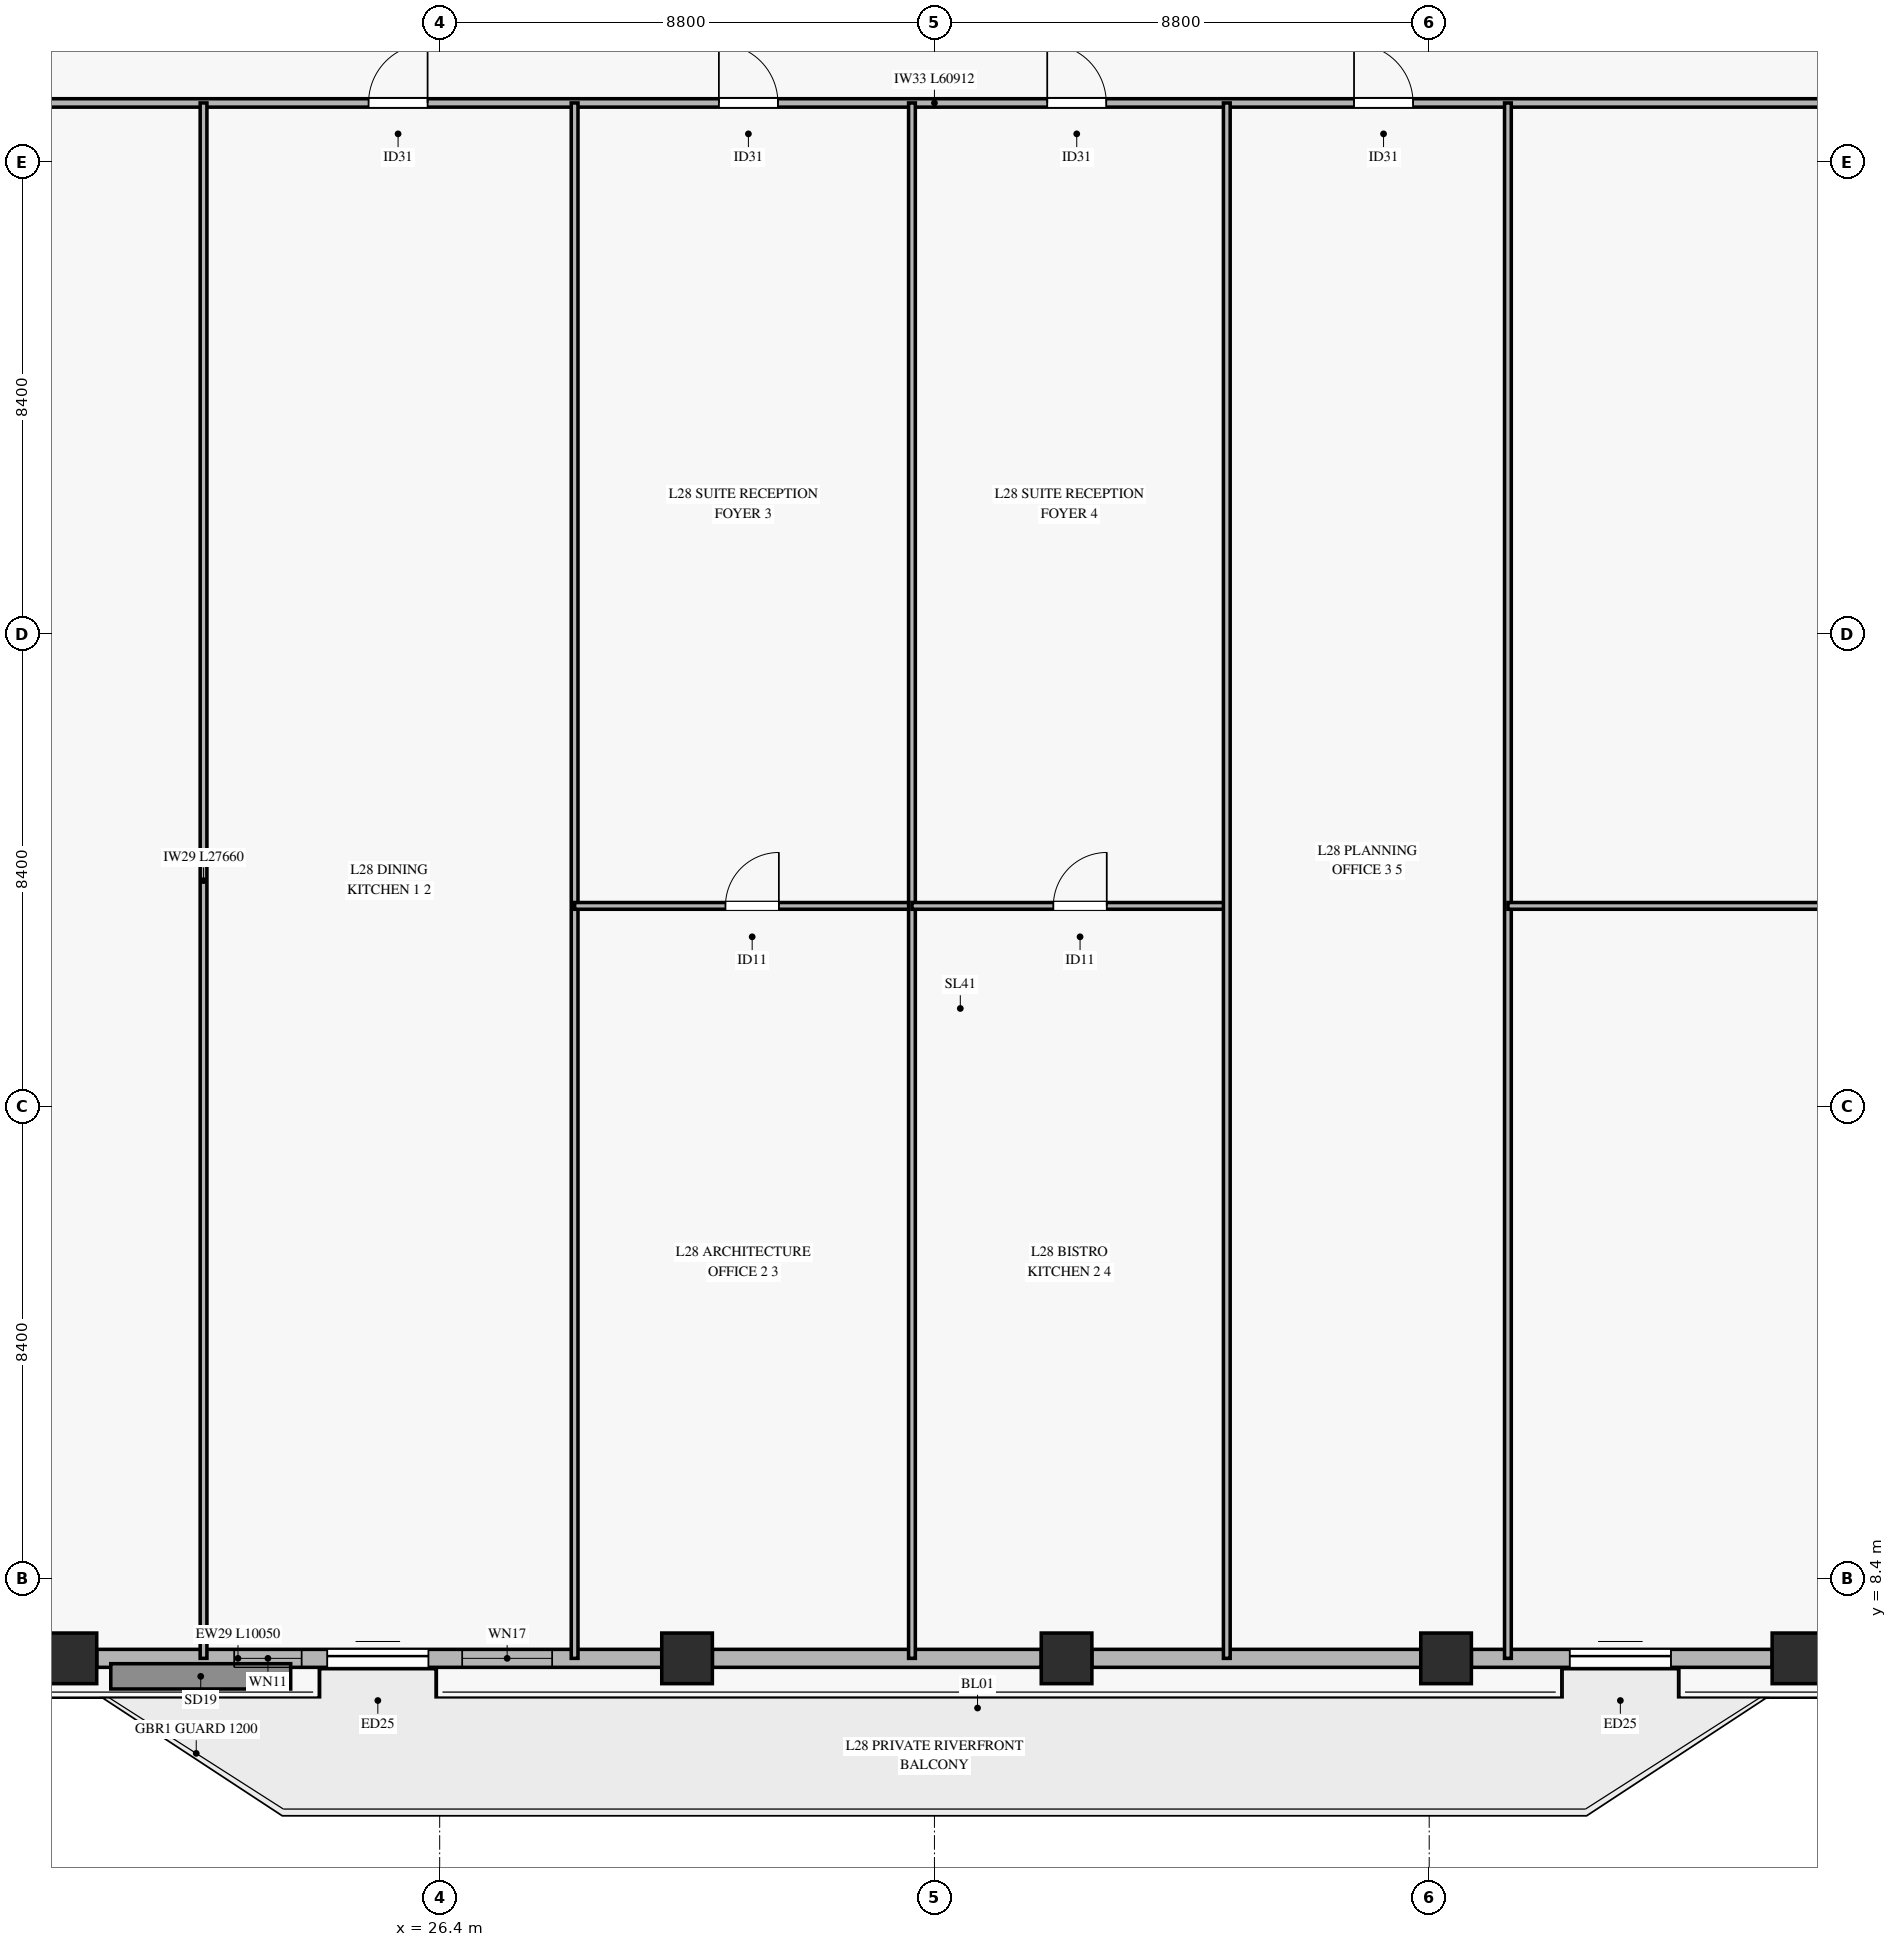
"""IFC4 building model, lengths in metres.
Left out: names, types, materials, properties, quantities, classifications, styles, units other than length and angle.
Written with IfcOpenShell. Run it as: python <this file> out.ifc"""

import sys

from ifc_helpers import new_model, si_unit, direction, frame, frame_2d, origin, origin_2d, place, context, subcontext, project, spatial, rectangle, hollow_rectangle, extrude, source, transform, mapped, element, fill, save


model = new_model("IFC4")
c1 = context("Model", 3, precision=1e-05, world=origin(), true_north=direction((0.0, 1.0)))
c2 = subcontext(c1, "Body", "Model", "MODEL_VIEW")
j1 = project(units=[si_unit("LENGTHUNIT", "METRE"), si_unit("PLANEANGLEUNIT", "RADIAN")], contexts=[c1])
p1 = place(None, origin())
s1 = spatial("IfcSite", under=j1, at=p1, CompositionType="ELEMENT")
p2 = place(p1, origin())
s2 = spatial("IfcBuilding", under=s1, at=p2, CompositionType="ELEMENT")
p3 = place(p2, frame((0.0, 0.0, 115.3)))
s3 = spatial("IfcBuildingStorey", under=s2, at=p3, CompositionType="ELEMENT", Elevation=115.3)
m1 = source(origin(), c2, "Body", "SweptSolid", [
    extrude(hollow_rectangle(XDim=0.9, YDim=0.9, WallThickness=0.04, at=origin_2d()), origin(), (0.0, 0.0, 1.0), 3.68),
])
for number, where, z_axis, x_axis in (
    (1, (19.85, 6.99, 0.0), (0.0, 0.0, 1.0), (1.0, 0.0, 0.0)),
    (2, (30.8, 6.99, 0.0), (0.0, 0.0, 1.0), (1.0, 0.0, 0.0)),
    (3, (37.55, 6.99, 0.0), (0.0, 0.0, 1.0), (1.0, 0.0, 0.0)),
    (4, (44.3, 6.99, 0.0), (0.0, 0.0, 1.0), (1.0, 0.0, 0.0)),
    (5, (50.55, 6.99, 0.0), (0.0, 0.0, 1.0), (1.0, 0.0, 0.0)),
):
    element("IfcColumn", number, at=place(p3, frame(where, z_axis=z_axis, x_axis=x_axis)), inside=s3, PredefinedType="COLUMN", context=c2, shape_type="MappedRepresentation", body=[
        mapped(m1, transform((0.0, 0.0, 0.0), x_axis=(1.0, 0.0, 0.0), y_axis=(0.0, 1.0, 0.0), z_axis=(0.0, 0.0, 1.0), scale=1.0)),
    ])
p4 = place(p3, frame((20.3, 6.99, 0.0), z_axis=(0.0, 0.0, 1.0), x_axis=(1.0, 0.0, 0.0)))
e6 = element("IfcWall", 6, at=p4, inside=s3, PredefinedType="SOLIDWALL", context=c2, shape_type="SweptSolid", body=[
    extrude(rectangle(XDim=10.05, YDim=0.32, at=frame_2d((5.025, 0.0))), origin(), (0.0, 0.0, 1.0), 3.16),
])
p5 = place(p4, frame((4.1, 0.0, 0.0)))
e7 = element("IfcOpeningElement", 7, at=p5, cuts=e6, PredefinedType="OPENING", context=c2, shape_type="SweptSolid", body=[
    extrude(rectangle(XDim=1.8, YDim=2.25, at=frame_2d((0.9, 1.125))), frame((0.0, 0.17, 0.0), z_axis=(0.0, -1.0, 0.0), x_axis=(1.0, 0.0, 0.0)), (0.0, 0.0, 1.0), 0.34),
])
p6 = place(p4, frame((2.445, 0.0, 0.45)))
e8 = element("IfcOpeningElement", 8, at=p6, cuts=e6, PredefinedType="OPENING", context=c2, shape_type="SweptSolid", body=[
    extrude(rectangle(XDim=1.2, YDim=2.0, at=frame_2d((0.6, 1.0))), frame((0.0, 0.17, 0.0), z_axis=(0.0, -1.0, 0.0), x_axis=(1.0, 0.0, 0.0)), (0.0, 0.0, 1.0), 0.34),
])
p7 = place(p4, frame((6.5, 0.0, 0.45)))
e9 = element("IfcOpeningElement", 9, at=p7, cuts=e6, PredefinedType="OPENING", context=c2, shape_type="SweptSolid", body=[
    extrude(rectangle(XDim=1.6, YDim=2.0, at=frame_2d((0.8, 1.0))), frame((0.0, 0.17, 0.0), z_axis=(0.0, -1.0, 0.0), x_axis=(1.0, 0.0, 0.0)), (0.0, 0.0, 1.0), 0.34),
])
for number, where, z_axis, x_axis in (
    (10, (31.25, 6.99, 0.0), (0.0, 0.0, 1.0), (1.0, 0.0, 0.0)),
    (11, (38.0, 6.99, 0.0), (0.0, 0.0, 1.0), (1.0, 0.0, 0.0)),
):
    element("IfcWall", number, at=place(p3, frame(where, z_axis=z_axis, x_axis=x_axis)), inside=s3, PredefinedType="SOLIDWALL", context=c2, shape_type="SweptSolid", body=[
        extrude(rectangle(XDim=5.85, YDim=0.32, at=frame_2d((2.925, 0.0))), origin(), (0.0, 0.0, 1.0), 3.16),
    ])
p8 = place(p3, frame((44.75, 6.99, 0.0), z_axis=(0.0, 0.0, 1.0), x_axis=(1.0, 0.0, 0.0)))
e12 = element("IfcWall", 12, at=p8, inside=s3, PredefinedType="SOLIDWALL", context=c2, shape_type="SweptSolid", body=[
    extrude(rectangle(XDim=5.35, YDim=0.32, at=frame_2d((2.675, 0.0))), origin(), (0.0, 0.0, 1.0), 3.16),
])
p9 = place(p8, frame((1.75, 0.0, 0.0)))
e13 = element("IfcOpeningElement", 13, at=p9, cuts=e12, PredefinedType="OPENING", context=c2, shape_type="SweptSolid", body=[
    extrude(rectangle(XDim=1.8, YDim=2.25, at=frame_2d((0.9, 1.125))), frame((0.0, 0.17, 0.0), z_axis=(0.0, -1.0, 0.0), x_axis=(1.0, 0.0, 0.0)), (0.0, 0.0, 1.0), 0.34),
])
p10 = place(p3, frame((4.744, 34.65, 0.0), z_axis=(0.0, 0.0, 1.0), x_axis=(1.0, 0.0, 0.0)))
e14 = element("IfcWall", 14, at=p10, inside=s3, PredefinedType="PARTITIONING", context=c2, shape_type="SweptSolid", body=[
    extrude(rectangle(XDim=60.912, YDim=0.15, at=frame_2d((30.456, 0.0))), origin(), (0.0, 0.0, 1.0), 2.765),
])
p11 = place(p10, frame((7.61, 0.0, 0.0)))
e15 = element("IfcOpeningElement", 15, at=p11, cuts=e14, PredefinedType="OPENING", context=c2, shape_type="SweptSolid", body=[
    extrude(rectangle(XDim=1.05, YDim=2.15, at=frame_2d((0.525, 1.075))), frame((0.0, 0.085, 0.0), z_axis=(0.0, -1.0, 0.0), x_axis=(1.0, 0.0, 0.0)), (0.0, 0.0, 1.0), 0.17),
])
p12 = place(p10, frame((20.391, 0.0, 0.0)))
e16 = element("IfcOpeningElement", 16, at=p12, cuts=e14, PredefinedType="OPENING", context=c2, shape_type="SweptSolid", body=[
    extrude(rectangle(XDim=1.05, YDim=2.15, at=frame_2d((0.525, 1.075))), frame((0.0, 0.085, 0.0), z_axis=(0.0, -1.0, 0.0), x_axis=(1.0, 0.0, 0.0)), (0.0, 0.0, 1.0), 0.17),
])
p13 = place(p10, frame((26.622, 0.0, 0.0)))
e17 = element("IfcOpeningElement", 17, at=p13, cuts=e14, PredefinedType="OPENING", context=c2, shape_type="SweptSolid", body=[
    extrude(rectangle(XDim=1.05, YDim=2.15, at=frame_2d((0.525, 1.075))), frame((0.0, 0.085, 0.0), z_axis=(0.0, -1.0, 0.0), x_axis=(1.0, 0.0, 0.0)), (0.0, 0.0, 1.0), 0.17),
])
p14 = place(p10, frame((32.462, 0.0, 0.0)))
e18 = element("IfcOpeningElement", 18, at=p14, cuts=e14, PredefinedType="OPENING", context=c2, shape_type="SweptSolid", body=[
    extrude(rectangle(XDim=1.05, YDim=2.15, at=frame_2d((0.525, 1.075))), frame((0.0, 0.085, 0.0), z_axis=(0.0, -1.0, 0.0), x_axis=(1.0, 0.0, 0.0)), (0.0, 0.0, 1.0), 0.17),
])
p15 = place(p10, frame((37.919, 0.0, 0.0)))
e19 = element("IfcOpeningElement", 19, at=p15, cuts=e14, PredefinedType="OPENING", context=c2, shape_type="SweptSolid", body=[
    extrude(rectangle(XDim=1.05, YDim=2.15, at=frame_2d((0.525, 1.075))), frame((0.0, 0.085, 0.0), z_axis=(0.0, -1.0, 0.0), x_axis=(1.0, 0.0, 0.0)), (0.0, 0.0, 1.0), 0.17),
])
p16 = place(p10, frame((48.844, 0.0, 0.0)))
e20 = element("IfcOpeningElement", 20, at=p16, cuts=e14, PredefinedType="OPENING", context=c2, shape_type="SweptSolid", body=[
    extrude(rectangle(XDim=1.05, YDim=2.15, at=frame_2d((0.525, 1.075))), frame((0.0, 0.085, 0.0), z_axis=(0.0, -1.0, 0.0), x_axis=(1.0, 0.0, 0.0)), (0.0, 0.0, 1.0), 0.17),
])
for number, where, z_axis, x_axis in (
    (21, (22.2, 6.99, 0.0), (0.0, 0.0, 1.0), (0.0, 1.0, 0.0)),
    (22, (28.8, 6.99, 0.0), (0.0, 0.0, 1.0), (0.0, 1.0, 0.0)),
):
    element("IfcWall", number, at=place(p3, frame(where, z_axis=z_axis, x_axis=x_axis)), inside=s3, PredefinedType="PARTITIONING", context=c2, shape_type="SweptSolid", body=[
        extrude(rectangle(XDim=27.66, YDim=0.12, at=frame_2d((13.83, 0.0))), origin(), (0.0, 0.0, 1.0), 3.165),
    ])
p17 = place(p3, frame((28.8, 20.371, 0.0), z_axis=(0.0, 0.0, 1.0), x_axis=(1.0, 0.0, 0.0)))
e23 = element("IfcWall", 23, at=p17, inside=s3, PredefinedType="PARTITIONING", context=c2, shape_type="SweptSolid", body=[
    extrude(rectangle(XDim=6.0, YDim=0.12, at=frame_2d((3.0, 0.0))), origin(), (0.0, 0.0, 1.0), 2.765),
])
p18 = place(p17, frame((2.683, 0.0, 0.0)))
e24 = element("IfcOpeningElement", 24, at=p18, cuts=e23, PredefinedType="OPENING", context=c2, shape_type="SweptSolid", body=[
    extrude(rectangle(XDim=0.95, YDim=2.1, at=frame_2d((0.475, 1.05))), frame((0.0, 0.07, 0.0), z_axis=(0.0, -1.0, 0.0), x_axis=(1.0, 0.0, 0.0)), (0.0, 0.0, 1.0), 0.14),
])
p19 = place(p3, frame((34.8, 6.99, 0.0), z_axis=(0.0, 0.0, 1.0), x_axis=(0.0, 1.0, 0.0)))
e25 = element("IfcWall", 25, at=p19, inside=s3, PredefinedType="PARTITIONING", context=c2, shape_type="SweptSolid", body=[
    extrude(rectangle(XDim=27.66, YDim=0.12, at=frame_2d((13.83, 0.0))), origin(), (0.0, 0.0, 1.0), 3.165),
])
p20 = place(p3, frame((34.8, 20.371, 0.0), z_axis=(0.0, 0.0, 1.0), x_axis=(1.0, 0.0, 0.0)))
e26 = element("IfcWall", 26, at=p20, inside=s3, PredefinedType="PARTITIONING", context=c2, shape_type="SweptSolid", body=[
    extrude(rectangle(XDim=5.6, YDim=0.12, at=frame_2d((2.8, 0.0))), origin(), (0.0, 0.0, 1.0), 2.765),
])
p21 = place(p20, frame((2.515, 0.0, 0.0)))
e27 = element("IfcOpeningElement", 27, at=p21, cuts=e26, PredefinedType="OPENING", context=c2, shape_type="SweptSolid", body=[
    extrude(rectangle(XDim=0.95, YDim=2.1, at=frame_2d((0.475, 1.05))), frame((0.0, 0.07, 0.0), z_axis=(0.0, -1.0, 0.0), x_axis=(1.0, 0.0, 0.0)), (0.0, 0.0, 1.0), 0.14),
])
for number, where, z_axis, x_axis in (
    (28, (40.4, 6.99, 0.0), (0.0, 0.0, 1.0), (0.0, 1.0, 0.0)),
    (29, (45.4, 6.99, 0.0), (0.0, 0.0, 1.0), (0.0, 1.0, 0.0)),
):
    element("IfcWall", number, at=place(p3, frame(where, z_axis=z_axis, x_axis=x_axis)), inside=s3, PredefinedType="PARTITIONING", context=c2, shape_type="SweptSolid", body=[
        extrude(rectangle(XDim=27.66, YDim=0.12, at=frame_2d((13.83, 0.0))), origin(), (0.0, 0.0, 1.0), 3.165),
    ])
p22 = place(p3, frame((45.4, 20.371, 0.0), z_axis=(0.0, 0.0, 1.0), x_axis=(1.0, 0.0, 0.0)))
e30 = element("IfcWall", 30, at=p22, inside=s3, PredefinedType="PARTITIONING", context=c2, shape_type="SweptSolid", body=[
    extrude(rectangle(XDim=20.256, YDim=0.12, at=frame_2d((10.128, 0.0))), origin(), (0.0, 0.0, 1.0), 2.765),
])
p23 = place(p22, frame((8.586, 0.0, 0.0)))
e31 = element("IfcOpeningElement", 31, at=p23, cuts=e30, PredefinedType="OPENING", context=c2, shape_type="SweptSolid", body=[
    extrude(rectangle(XDim=0.95, YDim=2.1, at=frame_2d((0.475, 1.05))), frame((0.0, 0.07, 0.0), z_axis=(0.0, -1.0, 0.0), x_axis=(1.0, 0.0, 0.0)), (0.0, 0.0, 1.0), 0.14),
])
m2 = source(origin(), c2, "Body", "SweptSolid", [
    extrude(rectangle(XDim=1.8, YDim=2.25, at=frame_2d((0.9, 1.125))), frame((0.0, 0.025, 0.0), z_axis=(0.0, -1.0, 0.0), x_axis=(1.0, 0.0, 0.0)), (0.0, 0.0, 1.0), 0.05),
])
p24 = place(p5, origin())
e32 = element("IfcDoor", 32, at=p24, inside=s3, OperationType="SLIDING_TO_LEFT", PredefinedType="DOOR", context=c2, shape_type="MappedRepresentation", body=[
    mapped(m2, transform((0.0, 0.0, 0.0), x_axis=(1.0, 0.0, 0.0), y_axis=(0.0, 1.0, 0.0), z_axis=(0.0, 0.0, 1.0), scale=1.0)),
])
fill(e7, e32)
m3 = source(origin(), c2, "Body", "SweptSolid", [
    extrude(rectangle(XDim=1.2, YDim=2.0, at=frame_2d((0.6, 1.0))), frame((0.0, 0.03, 0.0), z_axis=(0.0, -1.0, 0.0), x_axis=(1.0, 0.0, 0.0)), (0.0, 0.0, 1.0), 0.06),
])
p25 = place(p6, origin())
e33 = element("IfcWindow", 33, at=p25, inside=s3, PartitioningType="SINGLE_PANEL", PredefinedType="WINDOW", context=c2, shape_type="MappedRepresentation", body=[
    mapped(m3, transform((0.0, 0.0, 0.0), x_axis=(1.0, 0.0, 0.0), y_axis=(0.0, 1.0, 0.0), z_axis=(0.0, 0.0, 1.0), scale=1.0)),
])
fill(e8, e33)
m4 = source(origin(), c2, "Body", "SweptSolid", [
    extrude(rectangle(XDim=1.6, YDim=2.0, at=frame_2d((0.8, 1.0))), frame((0.0, 0.03, 0.0), z_axis=(0.0, -1.0, 0.0), x_axis=(1.0, 0.0, 0.0)), (0.0, 0.0, 1.0), 0.06),
])
p26 = place(p7, origin())
e34 = element("IfcWindow", 34, at=p26, inside=s3, PartitioningType="SINGLE_PANEL", PredefinedType="WINDOW", context=c2, shape_type="MappedRepresentation", body=[
    mapped(m4, transform((0.0, 0.0, 0.0), x_axis=(1.0, 0.0, 0.0), y_axis=(0.0, 1.0, 0.0), z_axis=(0.0, 0.0, 1.0), scale=1.0)),
])
fill(e9, e34)
p27 = place(p9, origin())
e35 = element("IfcDoor", 35, at=p27, inside=s3, OperationType="SLIDING_TO_LEFT", PredefinedType="DOOR", context=c2, shape_type="MappedRepresentation", body=[
    mapped(m2, transform((0.0, 0.0, 0.0), x_axis=(1.0, 0.0, 0.0), y_axis=(0.0, 1.0, 0.0), z_axis=(0.0, 0.0, 1.0), scale=1.0)),
])
fill(e13, e35)
m5 = source(origin(), c2, "Body", "SweptSolid", [
    extrude(rectangle(XDim=1.05, YDim=2.15, at=frame_2d((0.525, 1.075))), frame((0.0, 0.025, 0.0), z_axis=(0.0, -1.0, 0.0), x_axis=(1.0, 0.0, 0.0)), (0.0, 0.0, 1.0), 0.05),
])
p28 = place(p12, origin())
e36 = element("IfcDoor", 36, at=p28, inside=s3, OperationType="SINGLE_SWING_RIGHT", PredefinedType="DOOR", context=c2, shape_type="MappedRepresentation", body=[
    mapped(m5, transform((0.0, 0.0, 0.0), x_axis=(1.0, 0.0, 0.0), y_axis=(0.0, 1.0, 0.0), z_axis=(0.0, 0.0, 1.0), scale=1.0)),
])
fill(e16, e36)
p29 = place(p13, origin())
e37 = element("IfcDoor", 37, at=p29, inside=s3, OperationType="SINGLE_SWING_LEFT", PredefinedType="DOOR", context=c2, shape_type="MappedRepresentation", body=[
    mapped(m5, transform((0.0, 0.0, 0.0), x_axis=(1.0, 0.0, 0.0), y_axis=(0.0, 1.0, 0.0), z_axis=(0.0, 0.0, 1.0), scale=1.0)),
])
fill(e17, e37)
m6 = source(origin(), c2, "Body", "SweptSolid", [
    extrude(rectangle(XDim=0.95, YDim=2.1, at=frame_2d((0.475, 1.05))), frame((0.0, 0.025, 0.0), z_axis=(0.0, -1.0, 0.0), x_axis=(1.0, 0.0, 0.0)), (0.0, 0.0, 1.0), 0.05),
])
p30 = place(p18, origin())
e38 = element("IfcDoor", 38, at=p30, inside=s3, OperationType="SINGLE_SWING_RIGHT", PredefinedType="DOOR", context=c2, shape_type="MappedRepresentation", body=[
    mapped(m6, transform((0.0, 0.0, 0.0), x_axis=(1.0, 0.0, 0.0), y_axis=(0.0, 1.0, 0.0), z_axis=(0.0, 0.0, 1.0), scale=1.0)),
])
fill(e24, e38)
p31 = place(p14, origin())
e39 = element("IfcDoor", 39, at=p31, inside=s3, OperationType="SINGLE_SWING_LEFT", PredefinedType="DOOR", context=c2, shape_type="MappedRepresentation", body=[
    mapped(m5, transform((0.0, 0.0, 0.0), x_axis=(1.0, 0.0, 0.0), y_axis=(0.0, 1.0, 0.0), z_axis=(0.0, 0.0, 1.0), scale=1.0)),
])
fill(e18, e39)
p32 = place(p21, origin())
e40 = element("IfcDoor", 40, at=p32, inside=s3, OperationType="SINGLE_SWING_RIGHT", PredefinedType="DOOR", context=c2, shape_type="MappedRepresentation", body=[
    mapped(m6, transform((0.0, 0.0, 0.0), x_axis=(1.0, 0.0, 0.0), y_axis=(0.0, 1.0, 0.0), z_axis=(0.0, 0.0, 1.0), scale=1.0)),
])
fill(e27, e40)
p33 = place(p15, origin())
e41 = element("IfcDoor", 41, at=p33, inside=s3, OperationType="SINGLE_SWING_LEFT", PredefinedType="DOOR", context=c2, shape_type="MappedRepresentation", body=[
    mapped(m5, transform((0.0, 0.0, 0.0), x_axis=(1.0, 0.0, 0.0), y_axis=(0.0, 1.0, 0.0), z_axis=(0.0, 0.0, 1.0), scale=1.0)),
])
fill(e19, e41)
save(model, sys.argv[1])
